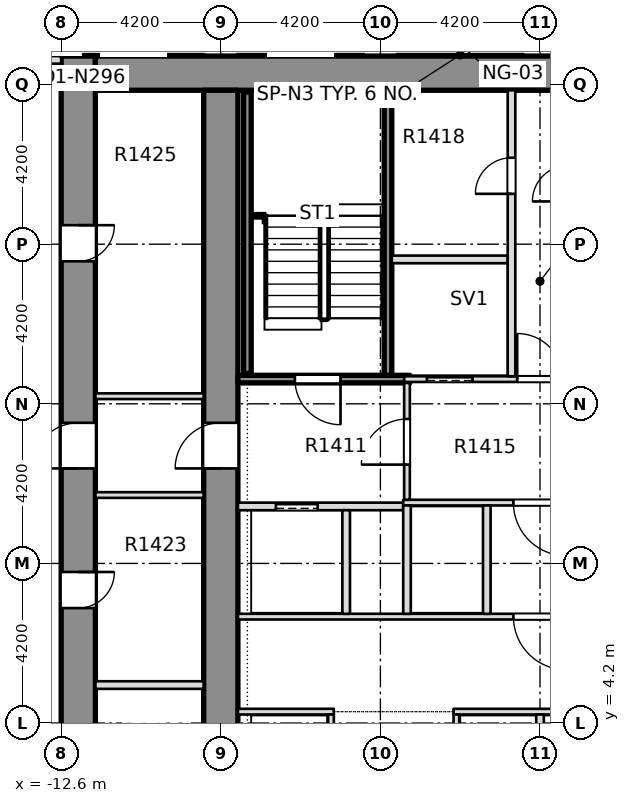
"""IFC4 building model, lengths in metres.
Left out: names, types, materials, properties, quantities, classifications, styles, units other than length and angle.
Written with IfcOpenShell. Run it as: python <this file> out.ifc"""

import sys

from ifc_helpers import new_model, si_unit, direction, frame, frame_2d, origin, place, context, subcontext, project, spatial, rectangle, extrude, element, fill, save


model = new_model("IFC4")
c1 = context("Model", 3, precision=1e-05, world=origin(), true_north=direction((0.0, 1.0)))
c2 = subcontext(c1, "Body", "Model", "MODEL_VIEW")
j1 = project(units=[si_unit("LENGTHUNIT", "METRE"), si_unit("PLANEANGLEUNIT", "RADIAN")], contexts=[c1])
p1 = place(None, origin())
s1 = spatial("IfcSite", under=j1, at=p1, CompositionType="ELEMENT")
p2 = place(p1, origin())
s2 = spatial("IfcBuilding", under=s1, at=p2, CompositionType="ELEMENT")
p3 = place(p2, frame((0.0, 0.0, 62.1)))
s3 = spatial("IfcBuildingStorey", under=s2, at=p3, CompositionType="ELEMENT", Elevation=62.1)
p4 = place(p3, frame((-12.15, -8.4, -0.32), z_axis=(0.0, 0.0, 1.0), x_axis=(0.0, 1.0, 0.0)))
e1 = element("IfcWall", 1, at=p4, inside=s3, PredefinedType="SHEAR", context=c2, shape_type="SweptSolid", body=[
    extrude(rectangle(XDim=30.15, YDim=0.9, at=frame_2d((15.075, 0.0))), origin(), (0.0, 0.0, 1.0), 3.45),
])
p5 = place(p4, frame((2.925, 0.0, 0.32)))
e2 = element("IfcOpeningElement", 2, at=p5, cuts=e1, PredefinedType="OPENING", context=c2, shape_type="SweptSolid", body=[
    extrude(rectangle(XDim=0.95, YDim=2.1, at=frame_2d((0.475, 1.05))), frame((0.0, 0.46, 0.0), z_axis=(0.0, -1.0, 0.0), x_axis=(1.0, 0.0, 0.0)), (0.0, 0.0, 1.0), 0.92),
])
p6 = place(p4, frame((7.025, 0.0, 0.32)))
e3 = element("IfcOpeningElement", 3, at=p6, cuts=e1, PredefinedType="OPENING", context=c2, shape_type="SweptSolid", body=[
    extrude(rectangle(XDim=0.95, YDim=2.1, at=frame_2d((0.475, 1.05))), frame((0.0, 0.46, 0.0), z_axis=(0.0, -1.0, 0.0), x_axis=(1.0, 0.0, 0.0)), (0.0, 0.0, 1.0), 0.92),
])
p7 = place(p4, frame((10.875, 0.0, 0.32)))
e4 = element("IfcOpeningElement", 4, at=p7, cuts=e1, PredefinedType="OPENING", context=c2, shape_type="SweptSolid", body=[
    extrude(rectangle(XDim=0.95, YDim=2.1, at=frame_2d((0.475, 1.05))), frame((0.0, 0.46, 0.0), z_axis=(0.0, -1.0, 0.0), x_axis=(1.0, 0.0, 0.0)), (0.0, 0.0, 1.0), 0.92),
])
p8 = place(p4, frame((15.625, 0.0, 0.32)))
e5 = element("IfcOpeningElement", 5, at=p8, cuts=e1, PredefinedType="OPENING", context=c2, shape_type="SweptSolid", body=[
    extrude(rectangle(XDim=0.95, YDim=2.1, at=frame_2d((0.475, 1.05))), frame((0.0, 0.46, 0.0), z_axis=(0.0, -1.0, 0.0), x_axis=(1.0, 0.0, 0.0)), (0.0, 0.0, 1.0), 0.92),
])
p9 = place(p4, frame((24.75, 0.0, 0.32)))
e6 = element("IfcOpeningElement", 6, at=p9, cuts=e1, PredefinedType="OPENING", context=c2, shape_type="SweptSolid", body=[
    extrude(rectangle(XDim=0.95, YDim=2.1, at=frame_2d((0.475, 1.05))), frame((0.0, 0.46, 0.0), z_axis=(0.0, -1.0, 0.0), x_axis=(1.0, 0.0, 0.0)), (0.0, 0.0, 1.0), 0.92),
])
p10 = place(p4, frame((19.3, 0.0, 0.32)))
e7 = element("IfcOpeningElement", 7, at=p10, cuts=e1, PredefinedType="OPENING", context=c2, shape_type="SweptSolid", body=[
    extrude(rectangle(XDim=1.2, YDim=2.1, at=frame_2d((0.6, 1.05))), frame((0.0, 0.46, 0.0), z_axis=(0.0, -1.0, 0.0), x_axis=(1.0, 0.0, 0.0)), (0.0, 0.0, 1.0), 0.92),
])
p11 = place(p3, frame((-11.7, 21.3, -0.32), z_axis=(0.0, 0.0, 1.0), x_axis=(1.0, 0.0, 0.0)))
e8 = element("IfcWall", 8, at=p11, inside=s3, PredefinedType="SOLIDWALL", context=c2, shape_type="SweptSolid", body=[
    extrude(rectangle(XDim=23.4, YDim=0.9, at=frame_2d((11.7, 0.0))), origin(), (0.0, 0.0, 1.0), 3.45),
])
p12 = place(p3, frame((-8.4, -7.5, -0.32), z_axis=(0.0, 0.0, 1.0), x_axis=(0.0, 1.0, 0.0)))
e9 = element("IfcWall", 9, at=p12, inside=s3, PredefinedType="SHEAR", context=c2, shape_type="SweptSolid", body=[
    extrude(rectangle(XDim=28.35, YDim=0.9, at=frame_2d((14.175, 0.0))), origin(), (0.0, 0.0, 1.0), 3.45),
])
p13 = place(p12, frame((18.4, 0.0, 0.32)))
e10 = element("IfcOpeningElement", 10, at=p13, cuts=e9, PredefinedType="OPENING", context=c2, shape_type="SweptSolid", body=[
    extrude(rectangle(XDim=1.2, YDim=2.1, at=frame_2d((0.6, 1.05))), frame((0.0, 0.46, 0.0), z_axis=(0.0, -1.0, 0.0), x_axis=(1.0, 0.0, 0.0)), (0.0, 0.0, 1.0), 0.92),
])
p14 = place(p3, frame((-12.6, 21.65, 0.0), z_axis=(0.0, 0.0, 1.0), x_axis=(-1.0, 0.0, 0.0)))
e11 = element("IfcWall", 11, at=p14, inside=s3, PredefinedType="STANDARD", context=c2, shape_type="SweptSolid", body=[
    extrude(rectangle(XDim=3.5, YDim=0.2, at=frame_2d((1.75, 0.0))), origin(), (0.0, 0.0, 1.0), 3.13),
])
p15 = place(p14, frame((0.3, 0.0, 0.2)))
e12 = element("IfcOpeningElement", 12, at=p15, cuts=e11, PredefinedType="OPENING", context=c2, shape_type="SweptSolid", body=[
    extrude(rectangle(XDim=1.8, YDim=2.65, at=frame_2d((0.9, 1.325))), frame((0.0, 0.11, 0.0), z_axis=(0.0, -1.0, 0.0), x_axis=(1.0, 0.0, 0.0)), (0.0, 0.0, 1.0), 0.22),
])
p16 = place(p14, frame((2.3, 0.0, 0.0)))
e13 = element("IfcOpeningElement", 13, at=p16, cuts=e11, PredefinedType="OPENING", context=c2, shape_type="SweptSolid", body=[
    extrude(rectangle(XDim=1.0, YDim=2.4, at=frame_2d((0.5, 1.2))), frame((0.0, 0.11, 0.0), z_axis=(0.0, -1.0, 0.0), x_axis=(1.0, 0.0, 0.0)), (0.0, 0.0, 1.0), 0.22),
])
p17 = place(p3, frame((-7.949, 4.5, 0.0), z_axis=(0.0, 0.0, 1.0), x_axis=(1.0, 0.0, 0.0)))
e14 = element("IfcWall", 14, at=p17, inside=s3, PredefinedType="PARTITIONING", context=c2, shape_type="SweptSolid", body=[
    extrude(rectangle(XDim=2.524, YDim=0.15, at=frame_2d((1.262, 0.0))), origin(), (0.0, 0.0, 1.0), 3.13),
])
p18 = place(p3, frame((-2.275, 4.5, 0.0), z_axis=(0.0, 0.0, 1.0), x_axis=(1.0, 0.0, 0.0)))
e15 = element("IfcWall", 15, at=p18, inside=s3, PredefinedType="PARTITIONING", context=c2, shape_type="SweptSolid", body=[
    extrude(rectangle(XDim=4.55, YDim=0.15, at=frame_2d((2.275, 0.0))), origin(), (0.0, 0.0, 1.0), 3.13),
])
p19 = place(p3, frame((-7.949, 7.0, 0.0), z_axis=(0.0, 0.0, 1.0), x_axis=(1.0, 0.0, 0.0)))
e16 = element("IfcWall", 16, at=p19, inside=s3, PredefinedType="PARTITIONING", context=c2, shape_type="SweptSolid", body=[
    extrude(rectangle(XDim=15.898, YDim=0.15, at=frame_2d((7.949, 0.0))), origin(), (0.0, 0.0, 1.0), 3.13),
])
p20 = place(p19, frame((7.249, 0.0, 0.0)))
e17 = element("IfcOpeningElement", 17, at=p20, cuts=e16, PredefinedType="OPENING", context=c2, shape_type="SweptSolid", body=[
    extrude(rectangle(XDim=1.4, YDim=2.1, at=frame_2d((0.7, 1.05))), frame((0.0, 0.085, 0.0), z_axis=(0.0, -1.0, 0.0), x_axis=(1.0, 0.0, 0.0)), (0.0, 0.0, 1.0), 0.17),
])
p21 = place(p3, frame((-7.949, 9.9, 0.0), z_axis=(0.0, 0.0, 1.0), x_axis=(1.0, 0.0, 0.0)))
e18 = element("IfcWall", 18, at=p21, inside=s3, PredefinedType="PARTITIONING", context=c2, shape_type="SweptSolid", body=[
    extrude(rectangle(XDim=4.349, YDim=0.2, at=frame_2d((2.174, 0.0))), origin(), (0.0, 0.0, 1.0), 3.13),
])
p22 = place(p21, frame((0.999, 0.0, 0.0)))
e19 = element("IfcOpeningElement", 19, at=p22, cuts=e18, PredefinedType="OPENING", context=c2, shape_type="SweptSolid", body=[
    extrude(rectangle(XDim=1.1, YDim=2.1, at=frame_2d((0.55, 1.05))), frame((0.0, 0.11, 0.0), z_axis=(0.0, -1.0, 0.0), x_axis=(1.0, 0.0, 0.0)), (0.0, 0.0, 1.0), 0.22),
])
p23 = place(p3, frame((-3.6, 10.0, 0.0), z_axis=(0.0, 0.0, 1.0), x_axis=(1.0, 0.0, 0.0)))
e20 = element("IfcWall", 20, at=p23, inside=s3, PredefinedType="PARTITIONING", context=c2, shape_type="SweptSolid", body=[
    extrude(rectangle(XDim=7.2, YDim=0.15, at=frame_2d((3.6, 0.0))), origin(), (0.0, 0.0, 1.0), 3.13),
])
p24 = place(p23, frame((2.9, 0.0, 0.0)))
e21 = element("IfcOpeningElement", 21, at=p24, cuts=e20, PredefinedType="OPENING", context=c2, shape_type="SweptSolid", body=[
    extrude(rectangle(XDim=1.4, YDim=2.1, at=frame_2d((0.7, 1.05))), frame((0.0, 0.085, 0.0), z_axis=(0.0, -1.0, 0.0), x_axis=(1.0, 0.0, 0.0)), (0.0, 0.0, 1.0), 0.17),
])
p25 = place(p3, frame((-7.949, 13.25, 0.0), z_axis=(0.0, 0.0, 1.0), x_axis=(1.0, 0.0, 0.0)))
e22 = element("IfcWall", 22, at=p25, inside=s3, PredefinedType="SOLIDWALL", context=c2, shape_type="SweptSolid", body=[
    extrude(rectangle(XDim=4.524, YDim=0.2, at=frame_2d((2.262, 0.0))), origin(), (0.0, 0.0, 1.0), 3.13),
])
p26 = place(p25, frame((1.499, 0.0, 0.0)))
e23 = element("IfcOpeningElement", 23, at=p26, cuts=e22, PredefinedType="OPENING", context=c2, shape_type="SweptSolid", body=[
    extrude(rectangle(XDim=1.2, YDim=2.1, at=frame_2d((0.6, 1.05))), frame((0.0, 0.11, 0.0), z_axis=(0.0, -1.0, 0.0), x_axis=(1.0, 0.0, 0.0)), (0.0, 0.0, 1.0), 0.22),
])
p27 = place(p3, frame((-3.575, 13.25, 0.0), z_axis=(0.0, 0.0, 1.0), x_axis=(1.0, 0.0, 0.0)))
e24 = element("IfcWall", 24, at=p27, inside=s3, PredefinedType="PARTITIONING", context=c2, shape_type="SweptSolid", body=[
    extrude(rectangle(XDim=7.15, YDim=0.15, at=frame_2d((3.575, 0.0))), origin(), (0.0, 0.0, 1.0), 3.13),
])
p28 = place(p27, frame((0.6, 0.0, 0.0)))
e25 = element("IfcOpeningElement", 25, at=p28, cuts=e24, PredefinedType="OPENING", context=c2, shape_type="SweptSolid", body=[
    extrude(rectangle(XDim=1.2, YDim=2.1, at=frame_2d((0.6, 1.05))), frame((0.0, 0.085, 0.0), z_axis=(0.0, -1.0, 0.0), x_axis=(1.0, 0.0, 0.0)), (0.0, 0.0, 1.0), 0.17),
])
p29 = place(p27, frame((5.4, 0.0, 0.0)))
e26 = element("IfcOpeningElement", 26, at=p29, cuts=e24, PredefinedType="OPENING", context=c2, shape_type="SweptSolid", body=[
    extrude(rectangle(XDim=1.1, YDim=2.1, at=frame_2d((0.55, 1.05))), frame((0.0, 0.085, 0.0), z_axis=(0.0, -1.0, 0.0), x_axis=(1.0, 0.0, 0.0)), (0.0, 0.0, 1.0), 0.17),
])
p30 = place(p27, frame((2.975, 0.0, 0.0)))
e27 = element("IfcOpeningElement", 27, at=p30, cuts=e24, PredefinedType="OPENING", context=c2, shape_type="SweptSolid", body=[
    extrude(rectangle(XDim=1.2, YDim=2.1, at=frame_2d((0.6, 1.05))), frame((0.0, 0.085, 0.0), z_axis=(0.0, -1.0, 0.0), x_axis=(1.0, 0.0, 0.0)), (0.0, 0.0, 1.0), 0.17),
])
p31 = place(p3, frame((-3.9, 16.4, 0.0), z_axis=(0.0, 0.0, 1.0), x_axis=(1.0, 0.0, 0.0)))
e28 = element("IfcWall", 28, at=p31, inside=s3, PredefinedType="PARTITIONING", context=c2, shape_type="SweptSolid", body=[
    extrude(rectangle(XDim=3.05, YDim=0.2, at=frame_2d((1.525, 0.0))), origin(), (0.0, 0.0, 1.0), 3.13),
])
p32 = place(p3, frame((-5.5, -7.499, 0.0), z_axis=(0.0, 0.0, 1.0), x_axis=(0.0, 1.0, 0.0)))
e29 = element("IfcWall", 29, at=p32, inside=s3, PredefinedType="PARTITIONING", context=c2, shape_type="SweptSolid", body=[
    extrude(rectangle(XDim=11.924, YDim=0.15, at=frame_2d((5.962, 0.0))), origin(), (0.0, 0.0, 1.0), 3.13),
])
p33 = place(p32, frame((0.949, 0.0, 0.0)))
e30 = element("IfcOpeningElement", 30, at=p33, cuts=e29, PredefinedType="OPENING", context=c2, shape_type="SweptSolid", body=[
    extrude(rectangle(XDim=1.1, YDim=2.1, at=frame_2d((0.55, 1.05))), frame((0.0, 0.085, 0.0), z_axis=(0.0, -1.0, 0.0), x_axis=(1.0, 0.0, 0.0)), (0.0, 0.0, 1.0), 0.17),
])
p34 = place(p32, frame((3.949, 0.0, 0.0)))
e31 = element("IfcOpeningElement", 31, at=p34, cuts=e29, PredefinedType="OPENING", context=c2, shape_type="SweptSolid", body=[
    extrude(rectangle(XDim=1.1, YDim=2.1, at=frame_2d((0.55, 1.05))), frame((0.0, 0.085, 0.0), z_axis=(0.0, -1.0, 0.0), x_axis=(1.0, 0.0, 0.0)), (0.0, 0.0, 1.0), 0.17),
])
p35 = place(p32, frame((6.949, 0.0, 0.0)))
e32 = element("IfcOpeningElement", 32, at=p35, cuts=e29, PredefinedType="OPENING", context=c2, shape_type="SweptSolid", body=[
    extrude(rectangle(XDim=1.1, YDim=2.1, at=frame_2d((0.55, 1.05))), frame((0.0, 0.085, 0.0), z_axis=(0.0, -1.0, 0.0), x_axis=(1.0, 0.0, 0.0)), (0.0, 0.0, 1.0), 0.17),
])
p36 = place(p32, frame((9.949, 0.0, 0.0)))
e33 = element("IfcOpeningElement", 33, at=p36, cuts=e29, PredefinedType="OPENING", context=c2, shape_type="SweptSolid", body=[
    extrude(rectangle(XDim=1.1, YDim=2.1, at=frame_2d((0.55, 1.05))), frame((0.0, 0.085, 0.0), z_axis=(0.0, -1.0, 0.0), x_axis=(1.0, 0.0, 0.0)), (0.0, 0.0, 1.0), 0.17),
])
p37 = place(p3, frame((-5.1, 7.075, 0.0), z_axis=(0.0, 0.0, 1.0), x_axis=(0.0, 1.0, 0.0)))
e34 = element("IfcWall", 34, at=p37, inside=s3, PredefinedType="PARTITIONING", context=c2, shape_type="SweptSolid", body=[
    extrude(rectangle(XDim=2.725, YDim=0.2, at=frame_2d((1.363, 0.0))), origin(), (0.0, 0.0, 1.0), 3.13),
])
p38 = place(p3, frame((-4.0, 13.35, 0.0), z_axis=(0.0, 0.0, 1.0), x_axis=(0.0, 1.0, 0.0)))
e35 = element("IfcWall", 35, at=p38, inside=s3, PredefinedType="SOLIDWALL", context=c2, shape_type="SweptSolid", body=[
    extrude(rectangle(XDim=7.499, YDim=0.2, at=frame_2d((3.75, 0.0))), origin(), (0.0, 0.0, 1.0), 3.13),
])
p39 = place(p3, frame((-3.5, 7.075, 0.0), z_axis=(0.0, 0.0, 1.0), x_axis=(0.0, 1.0, 0.0)))
e36 = element("IfcWall", 36, at=p39, inside=s3, PredefinedType="PARTITIONING", context=c2, shape_type="SweptSolid", body=[
    extrude(rectangle(XDim=2.85, YDim=0.2, at=frame_2d((1.425, 0.0))), origin(), (0.0, 0.0, 1.0), 3.13),
])
p40 = place(p3, frame((-3.5, 10.075, 0.0), z_axis=(0.0, 0.0, 1.0), x_axis=(0.0, 1.0, 0.0)))
e37 = element("IfcWall", 37, at=p40, inside=s3, PredefinedType="PARTITIONING", context=c2, shape_type="SweptSolid", body=[
    extrude(rectangle(XDim=3.075, YDim=0.15, at=frame_2d((1.538, 0.0))), origin(), (0.0, 0.0, 1.0), 3.13),
])
p41 = place(p40, frame((0.925, 0.0, 0.0)))
e38 = element("IfcOpeningElement", 38, at=p41, cuts=e37, PredefinedType="OPENING", context=c2, shape_type="SweptSolid", body=[
    extrude(rectangle(XDim=1.2, YDim=2.1, at=frame_2d((0.6, 1.05))), frame((0.0, 0.085, 0.0), z_axis=(0.0, -1.0, 0.0), x_axis=(1.0, 0.0, 0.0)), (0.0, 0.0, 1.0), 0.17),
])
p42 = place(p3, frame((-2.2, -7.499, 0.0), z_axis=(0.0, 0.0, 1.0), x_axis=(0.0, 1.0, 0.0)))
e39 = element("IfcWall", 39, at=p42, inside=s3, PredefinedType="PARTITIONING", context=c2, shape_type="SweptSolid", body=[
    extrude(rectangle(XDim=11.924, YDim=0.15, at=frame_2d((5.962, 0.0))), origin(), (0.0, 0.0, 1.0), 3.13),
])
p43 = place(p42, frame((0.949, 0.0, 0.0)))
e40 = element("IfcOpeningElement", 40, at=p43, cuts=e39, PredefinedType="OPENING", context=c2, shape_type="SweptSolid", body=[
    extrude(rectangle(XDim=1.1, YDim=2.1, at=frame_2d((0.55, 1.05))), frame((0.0, 0.085, 0.0), z_axis=(0.0, -1.0, 0.0), x_axis=(1.0, 0.0, 0.0)), (0.0, 0.0, 1.0), 0.17),
])
p44 = place(p42, frame((3.949, 0.0, 0.0)))
e41 = element("IfcOpeningElement", 41, at=p44, cuts=e39, PredefinedType="OPENING", context=c2, shape_type="SweptSolid", body=[
    extrude(rectangle(XDim=1.1, YDim=2.1, at=frame_2d((0.55, 1.05))), frame((0.0, 0.085, 0.0), z_axis=(0.0, -1.0, 0.0), x_axis=(1.0, 0.0, 0.0)), (0.0, 0.0, 1.0), 0.17),
])
p45 = place(p42, frame((6.949, 0.0, 0.0)))
e42 = element("IfcOpeningElement", 42, at=p45, cuts=e39, PredefinedType="OPENING", context=c2, shape_type="SweptSolid", body=[
    extrude(rectangle(XDim=1.1, YDim=2.1, at=frame_2d((0.55, 1.05))), frame((0.0, 0.085, 0.0), z_axis=(0.0, -1.0, 0.0), x_axis=(1.0, 0.0, 0.0)), (0.0, 0.0, 1.0), 0.17),
])
p46 = place(p42, frame((9.949, 0.0, 0.0)))
e43 = element("IfcOpeningElement", 43, at=p46, cuts=e39, PredefinedType="OPENING", context=c2, shape_type="SweptSolid", body=[
    extrude(rectangle(XDim=1.1, YDim=2.1, at=frame_2d((0.55, 1.05))), frame((0.0, 0.085, 0.0), z_axis=(0.0, -1.0, 0.0), x_axis=(1.0, 0.0, 0.0)), (0.0, 0.0, 1.0), 0.17),
])
p47 = place(p3, frame((-1.4, 7.075, 0.0), z_axis=(0.0, 0.0, 1.0), x_axis=(0.0, 1.0, 0.0)))
e44 = element("IfcWall", 44, at=p47, inside=s3, PredefinedType="PARTITIONING", context=c2, shape_type="SweptSolid", body=[
    extrude(rectangle(XDim=2.85, YDim=0.2, at=frame_2d((1.425, 0.0))), origin(), (0.0, 0.0, 1.0), 3.13),
])
p48 = place(p3, frame((-0.75, 13.325, 0.0), z_axis=(0.0, 0.0, 1.0), x_axis=(0.0, 1.0, 0.0)))
e45 = element("IfcWall", 45, at=p48, inside=s3, PredefinedType="PARTITIONING", context=c2, shape_type="SweptSolid", body=[
    extrude(rectangle(XDim=7.524, YDim=0.2, at=frame_2d((3.762, 0.0))), origin(), (0.0, 0.0, 1.0), 3.13),
])
p49 = place(p48, frame((4.8, 0.0, 0.0)))
e46 = element("IfcOpeningElement", 46, at=p49, cuts=e45, PredefinedType="OPENING", context=c2, shape_type="SweptSolid", body=[
    extrude(rectangle(XDim=0.95, YDim=2.1, at=frame_2d((0.475, 1.05))), frame((0.0, 0.11, 0.0), z_axis=(0.0, -1.0, 0.0), x_axis=(1.0, 0.0, 0.0)), (0.0, 0.0, 1.0), 0.22),
])
p50 = place(p3, frame((0.0, -7.499, 0.0), z_axis=(0.0, 0.0, 1.0), x_axis=(0.0, 1.0, 0.0)))
e47 = element("IfcWall", 47, at=p50, inside=s3, PredefinedType="PARTITIONING", context=c2, shape_type="SweptSolid", body=[
    extrude(rectangle(XDim=11.924, YDim=0.2, at=frame_2d((5.962, 0.0))), origin(), (0.0, 0.0, 1.0), 3.13),
])
p51 = place(p3, frame((-11.699, 5.2, 0.0), z_axis=(0.0, 0.0, 1.0), x_axis=(1.0, 0.0, 0.0)))
e48 = element("IfcWall", 48, at=p51, inside=s3, PredefinedType="PARTITIONING", context=c2, shape_type="SweptSolid", body=[
    extrude(rectangle(XDim=2.848, YDim=0.2, at=frame_2d((1.424, 0.0))), origin(), (0.0, 0.0, 1.0), 3.13),
])
for number, where, z_axis, x_axis in (
    (49, (-11.699, 10.2, 0.0), (0.0, 0.0, 1.0), (1.0, 0.0, 0.0)),
    (50, (-11.699, 12.8, 0.0), (0.0, 0.0, 1.0), (1.0, 0.0, 0.0)),
):
    element("IfcWall", number, at=place(p3, frame(where, z_axis=z_axis, x_axis=x_axis)), inside=s3, PredefinedType="PARTITIONING", context=c2, shape_type="SweptSolid", body=[
        extrude(rectangle(XDim=2.848, YDim=0.15, at=frame_2d((1.424, 0.0))), origin(), (0.0, 0.0, 1.0), 3.13),
    ])
p52 = place(p3, frame((-7.7, 13.4, 0.0), z_axis=(0.0, 0.0, 1.0), x_axis=(0.0, 1.0, 0.0)))
e51 = element("IfcWall", 51, at=p52, inside=s3, PredefinedType="SOLIDWALL", context=c2, shape_type="SweptSolid", body=[
    extrude(rectangle(XDim=7.4, YDim=0.2, at=frame_2d((3.7, 0.0))), origin(), (0.0, 0.0, 1.0), 3.13),
])
p53 = place(p26, origin())
e52 = element("IfcDoor", 52, at=p53, inside=s3, OperationType="SINGLE_SWING_LEFT", PredefinedType="DOOR", context=c2, shape_type="SweptSolid", body=[
    extrude(rectangle(XDim=1.2, YDim=2.1, at=frame_2d((0.6, 1.05))), frame((0.0, 0.025, 0.0), z_axis=(0.0, -1.0, 0.0), x_axis=(1.0, 0.0, 0.0)), (0.0, 0.0, 1.0), 0.05),
])
fill(e23, e52)
p54 = place(p22, origin())
e53 = element("IfcDoor", 53, at=p54, inside=s3, OperationType="SLIDING_TO_RIGHT", PredefinedType="DOOR", context=c2, shape_type="SweptSolid", body=[
    extrude(rectangle(XDim=1.1, YDim=2.1, at=frame_2d((0.55, 1.05))), frame((0.0, 0.025, 0.0), z_axis=(0.0, -1.0, 0.0), x_axis=(1.0, 0.0, 0.0)), (0.0, 0.0, 1.0), 0.05),
])
fill(e19, e53)
p55 = place(p20, origin())
e54 = element("IfcDoor", 54, at=p55, inside=s3, OperationType="SINGLE_SWING_RIGHT", PredefinedType="DOOR", context=c2, shape_type="SweptSolid", body=[
    extrude(rectangle(XDim=1.4, YDim=2.1, at=frame_2d((0.7, 1.05))), frame((0.0, 0.025, 0.0), z_axis=(0.0, -1.0, 0.0), x_axis=(1.0, 0.0, 0.0)), (0.0, 0.0, 1.0), 0.05),
])
fill(e17, e54)
p56 = place(p24, origin())
e55 = element("IfcDoor", 55, at=p56, inside=s3, OperationType="SINGLE_SWING_RIGHT", PredefinedType="DOOR", context=c2, shape_type="SweptSolid", body=[
    extrude(rectangle(XDim=1.4, YDim=2.1, at=frame_2d((0.7, 1.05))), frame((0.0, 0.025, 0.0), z_axis=(0.0, -1.0, 0.0), x_axis=(1.0, 0.0, 0.0)), (0.0, 0.0, 1.0), 0.05),
])
fill(e21, e55)
p57 = place(p28, origin())
e56 = element("IfcDoor", 56, at=p57, inside=s3, OperationType="SLIDING_TO_RIGHT", PredefinedType="DOOR", context=c2, shape_type="SweptSolid", body=[
    extrude(rectangle(XDim=1.2, YDim=2.1, at=frame_2d((0.6, 1.05))), frame((0.0, 0.025, 0.0), z_axis=(0.0, -1.0, 0.0), x_axis=(1.0, 0.0, 0.0)), (0.0, 0.0, 1.0), 0.05),
])
fill(e25, e56)
p58 = place(p30, origin())
e57 = element("IfcDoor", 57, at=p58, inside=s3, OperationType="SINGLE_SWING_RIGHT", PredefinedType="DOOR", context=c2, shape_type="SweptSolid", body=[
    extrude(rectangle(XDim=1.2, YDim=2.1, at=frame_2d((0.6, 1.05))), frame((0.0, 0.025, 0.0), z_axis=(0.0, -1.0, 0.0), x_axis=(1.0, 0.0, 0.0)), (0.0, 0.0, 1.0), 0.05),
])
fill(e27, e57)
p59 = place(p49, origin())
e58 = element("IfcDoor", 58, at=p59, inside=s3, OperationType="SINGLE_SWING_RIGHT", PredefinedType="DOOR", context=c2, shape_type="SweptSolid", body=[
    extrude(rectangle(XDim=0.95, YDim=2.1, at=frame_2d((0.475, 1.05))), frame((0.0, 0.025, 0.0), z_axis=(0.0, -1.0, 0.0), x_axis=(1.0, 0.0, 0.0)), (0.0, 0.0, 1.0), 0.05),
])
fill(e46, e58)
p60 = place(p41, origin())
e59 = element("IfcDoor", 59, at=p60, inside=s3, OperationType="SINGLE_SWING_RIGHT", PredefinedType="DOOR", context=c2, shape_type="SweptSolid", body=[
    extrude(rectangle(XDim=1.2, YDim=2.1, at=frame_2d((0.6, 1.05))), frame((0.0, 0.025, 0.0), z_axis=(0.0, -1.0, 0.0), x_axis=(1.0, 0.0, 0.0)), (0.0, 0.0, 1.0), 0.05),
])
fill(e38, e59)
p61 = place(p8, origin())
e60 = element("IfcDoor", 60, at=p61, inside=s3, OperationType="SINGLE_SWING_LEFT", PredefinedType="DOOR", context=c2, shape_type="SweptSolid", body=[
    extrude(rectangle(XDim=0.95, YDim=2.1, at=frame_2d((0.475, 1.05))), frame((0.0, 0.025, 0.0), z_axis=(0.0, -1.0, 0.0), x_axis=(1.0, 0.0, 0.0)), (0.0, 0.0, 1.0), 0.05),
])
fill(e5, e60)
p62 = place(p9, origin())
e61 = element("IfcDoor", 61, at=p62, inside=s3, OperationType="SINGLE_SWING_LEFT", PredefinedType="DOOR", context=c2, shape_type="SweptSolid", body=[
    extrude(rectangle(XDim=0.95, YDim=2.1, at=frame_2d((0.475, 1.05))), frame((0.0, 0.025, 0.0), z_axis=(0.0, -1.0, 0.0), x_axis=(1.0, 0.0, 0.0)), (0.0, 0.0, 1.0), 0.05),
])
fill(e6, e61)
p63 = place(p10, origin())
e62 = element("IfcDoor", 62, at=p63, inside=s3, OperationType="SINGLE_SWING_LEFT", PredefinedType="DOOR", context=c2, shape_type="SweptSolid", body=[
    extrude(rectangle(XDim=1.2, YDim=2.1, at=frame_2d((0.6, 1.05))), frame((0.0, 0.025, 0.0), z_axis=(0.0, -1.0, 0.0), x_axis=(1.0, 0.0, 0.0)), (0.0, 0.0, 1.0), 0.05),
])
fill(e7, e62)
p64 = place(p13, origin())
e63 = element("IfcDoor", 63, at=p64, inside=s3, OperationType="SINGLE_SWING_LEFT", PredefinedType="DOOR", context=c2, shape_type="SweptSolid", body=[
    extrude(rectangle(XDim=1.2, YDim=2.1, at=frame_2d((0.6, 1.05))), frame((0.0, 0.025, 0.0), z_axis=(0.0, -1.0, 0.0), x_axis=(1.0, 0.0, 0.0)), (0.0, 0.0, 1.0), 0.05),
])
fill(e10, e63)
save(model, sys.argv[1])
